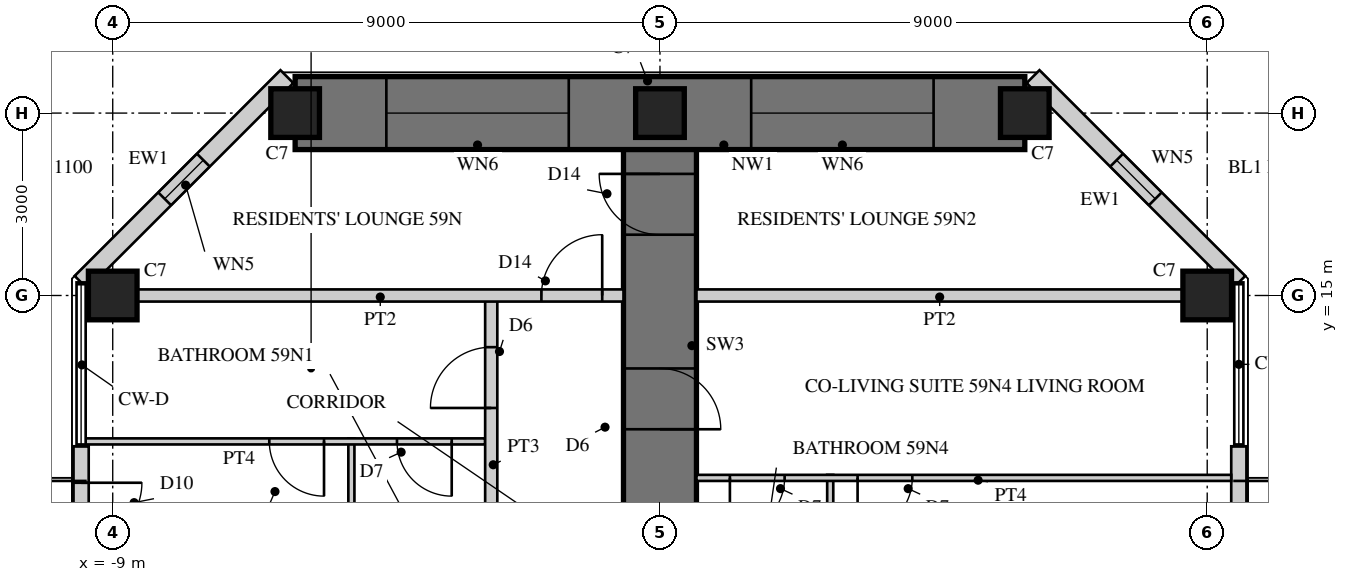
"""IFC4 building model, lengths in metres.
Left out: names, types, materials, properties, quantities, classifications, styles, units other than length and angle.
Written with IfcOpenShell. Run it as: python <this file> out.ifc"""

import sys

from ifc_helpers import new_model, si_unit, direction, frame, frame_2d, origin, origin_2d, place, context, subcontext, project, spatial, rectangle, hollow_rectangle, extrude, element, fill, save


model = new_model("IFC4")
c1 = context("Model", 3, precision=1e-05, world=origin(), true_north=direction((0.0, 1.0)))
c2 = subcontext(c1, "Body", "Model", "MODEL_VIEW")
j1 = project(units=[si_unit("LENGTHUNIT", "METRE"), si_unit("PLANEANGLEUNIT", "RADIAN")], contexts=[c1])
p1 = place(None, origin())
s1 = spatial("IfcSite", under=j1, at=p1, CompositionType="ELEMENT")
p2 = place(p1, origin())
s2 = spatial("IfcBuilding", under=s1, at=p2, CompositionType="ELEMENT")
p3 = place(p2, frame((0.0, 0.0, 232.3)))
s3 = spatial("IfcBuildingStorey", under=s2, at=p3, CompositionType="ELEMENT", Elevation=232.3)
p4 = place(p3, frame((0.0, 9.0, 0.0), z_axis=(0.0, 0.0, 1.0), x_axis=(0.0, 1.0, 0.0)))
e1 = element("IfcWall", 1, at=p4, inside=s3, PredefinedType="SHEAR", context=c2, shape_type="SweptSolid", body=[
    extrude(rectangle(XDim=9.0, YDim=1.2, at=frame_2d((4.5, 0.0))), origin(), (0.0, 0.0, 1.0), 3.4),
])
p5 = place(p4, frame((3.8, 0.0, 0.0)))
e2 = element("IfcOpeningElement", 2, at=p5, cuts=e1, PredefinedType="OPENING", context=c2, shape_type="SweptSolid", body=[
    extrude(rectangle(XDim=1.0, YDim=2.15, at=frame_2d((0.5, 1.075))), frame((0.0, 0.61, 0.0), z_axis=(0.0, -1.0, 0.0), x_axis=(1.0, 0.0, 0.0)), (0.0, 0.0, 1.0), 1.22),
])
p6 = place(p4, frame((7.0, 0.0, 0.0)))
e3 = element("IfcOpeningElement", 3, at=p6, cuts=e1, PredefinedType="OPENING", context=c2, shape_type="SweptSolid", body=[
    extrude(rectangle(XDim=1.0, YDim=2.2, at=frame_2d((0.5, 1.1))), frame((0.0, 0.61, 0.0), z_axis=(0.0, -1.0, 0.0), x_axis=(1.0, 0.0, 0.0)), (0.0, 0.0, 1.0), 1.22),
])
p7 = place(p3, frame((6.0, 18.0, 0.0), z_axis=(0.0, 0.0, 1.0), x_axis=(-1.0, 0.0, 0.0)))
e4 = element("IfcWall", 4, at=p7, inside=s3, PredefinedType="SHEAR", context=c2, shape_type="SweptSolid", body=[
    extrude(rectangle(XDim=12.0, YDim=1.2, at=frame_2d((6.0, 0.0))), origin(), (0.0, 0.0, 1.0), 3.4),
])
p8 = place(p7, frame((1.5, 0.0, 0.6)))
e5 = element("IfcOpeningElement", 5, at=p8, cuts=e4, PredefinedType="OPENING", context=c2, shape_type="SweptSolid", body=[
    extrude(rectangle(XDim=3.0, YDim=2.4, at=frame_2d((1.5, 1.2))), frame((0.0, 0.61, 0.0), z_axis=(0.0, -1.0, 0.0), x_axis=(1.0, 0.0, 0.0)), (0.0, 0.0, 1.0), 1.22),
])
p9 = place(p7, frame((7.5, 0.0, 0.6)))
e6 = element("IfcOpeningElement", 6, at=p9, cuts=e4, PredefinedType="OPENING", context=c2, shape_type="SweptSolid", body=[
    extrude(rectangle(XDim=3.0, YDim=2.4, at=frame_2d((1.5, 1.2))), frame((0.0, 0.61, 0.0), z_axis=(0.0, -1.0, 0.0), x_axis=(1.0, 0.0, 0.0)), (0.0, 0.0, 1.0), 1.22),
])
for number, where, z_axis, x_axis in (
    (7, (9.0, 15.0, 0.0), (0.0, 0.0, 1.0), (1.0, 0.0, 0.0)),
    (8, (-9.0, 15.0, 0.0), (0.0, 0.0, 1.0), (1.0, 0.0, 0.0)),
    (9, (6.0, 18.0, 0.0), (0.0, 0.0, 1.0), (1.0, 0.0, 0.0)),
    (10, (0.0, 18.0, 0.0), (0.0, 0.0, 1.0), (1.0, 0.0, 0.0)),
    (11, (-6.0, 18.0, 0.0), (0.0, 0.0, 1.0), (1.0, 0.0, 0.0)),
):
    element("IfcColumn", number, at=place(p3, frame(where, z_axis=z_axis, x_axis=x_axis)), inside=s3, PredefinedType="COLUMN", context=c2, shape_type="SweptSolid", body=[
        extrude(rectangle(XDim=0.8, YDim=0.8, at=origin_2d()), origin(), (0.0, 0.0, 1.0), 3.4),
    ])
p10 = place(p3, frame((9.52, 9.395, 0.0), z_axis=(0.0, 0.0, 1.0), x_axis=(0.0, 1.0, 0.0)))
e12 = element("IfcWall", 12, at=p10, inside=s3, PredefinedType="SOLIDWALL", context=c2, shape_type="SweptSolid", body=[
    extrude(rectangle(XDim=3.125, YDim=0.25, at=frame_2d((1.562, 0.0))), origin(), (0.0, 0.0, 1.0), 3.22),
])
p11 = place(p10, frame((0.6, 0.0, 0.0)))
e13 = element("IfcOpeningElement", 13, at=p11, cuts=e12, PredefinedType="OPENING", context=c2, shape_type="SweptSolid", body=[
    extrude(rectangle(XDim=1.0, YDim=2.2, at=frame_2d((0.5, 1.1))), frame((0.0, 0.135, 0.0), z_axis=(0.0, -1.0, 0.0), x_axis=(1.0, 0.0, 0.0)), (0.0, 0.0, 1.0), 0.27),
])
p12 = place(p3, frame((9.52, 15.215, 0.0), z_axis=(0.0, 0.0, 1.0), x_axis=(-0.707081278264, 0.707132283189, 0.0)))
e14 = element("IfcWall", 14, at=p12, inside=s3, PredefinedType="SOLIDWALL", context=c2, shape_type="SweptSolid", body=[
    extrude(rectangle(XDim=4.787, YDim=0.3, at=frame_2d((2.393, 0.0))), origin(), (0.0, 0.0, 1.0), 3.22),
])
p13 = place(p12, frame((1.943, 0.0, 0.3)))
e15 = element("IfcOpeningElement", 15, at=p13, cuts=e14, PredefinedType="OPENING", context=c2, shape_type="SweptSolid", body=[
    extrude(rectangle(XDim=0.9, YDim=2.4, at=frame_2d((0.45, 1.2))), frame((0.0, 0.16, 0.0), z_axis=(0.0, -1.0, 0.0), x_axis=(1.0, 0.0, 0.0)), (0.0, 0.0, 1.0), 0.32),
])
p14 = place(p3, frame((-6.135, 18.6, 0.0), z_axis=(0.0, 0.0, 1.0), x_axis=(-0.707081278264, -0.707132283189, 0.0)))
e16 = element("IfcWall", 16, at=p14, inside=s3, PredefinedType="SOLIDWALL", context=c2, shape_type="SweptSolid", body=[
    extrude(rectangle(XDim=4.787, YDim=0.3, at=frame_2d((2.393, 0.0))), origin(), (0.0, 0.0, 1.0), 3.22),
])
p15 = place(p14, frame((1.943, 0.0, 0.3)))
e17 = element("IfcOpeningElement", 17, at=p15, cuts=e16, PredefinedType="OPENING", context=c2, shape_type="SweptSolid", body=[
    extrude(rectangle(XDim=0.9, YDim=2.4, at=frame_2d((0.45, 1.2))), frame((0.0, 0.16, 0.0), z_axis=(0.0, -1.0, 0.0), x_axis=(1.0, 0.0, 0.0)), (0.0, 0.0, 1.0), 0.32),
])
p16 = place(p3, frame((-9.52, 12.52, 0.0), z_axis=(0.0, 0.0, 1.0), x_axis=(0.0, -1.0, 0.0)))
e18 = element("IfcWall", 18, at=p16, inside=s3, PredefinedType="SOLIDWALL", context=c2, shape_type="SweptSolid", body=[
    extrude(rectangle(XDim=2.875, YDim=0.25, at=frame_2d((1.438, 0.0))), origin(), (0.0, 0.0, 1.0), 3.22),
])
p17 = place(p16, frame((0.6, 0.0, 0.0)))
e19 = element("IfcOpeningElement", 19, at=p17, cuts=e18, PredefinedType="OPENING", context=c2, shape_type="SweptSolid", body=[
    extrude(rectangle(XDim=1.0, YDim=2.2, at=frame_2d((0.5, 1.1))), frame((0.0, 0.135, 0.0), z_axis=(0.0, -1.0, 0.0), x_axis=(1.0, 0.0, 0.0)), (0.0, 0.0, 1.0), 0.27),
])
p18 = place(p3, frame((-5.075, 9.4, 0.0), z_axis=(0.0, 0.0, 1.0), x_axis=(0.0, 1.0, 0.0)))
e20 = element("IfcWall", 20, at=p18, inside=s3, PredefinedType="PARTITIONING", context=c2, shape_type="SweptSolid", body=[
    extrude(rectangle(XDim=3.25, YDim=0.1, at=frame_2d((1.625, 0.0))), origin(), (0.0, 0.0, 1.0), 3.22),
])
p19 = place(p3, frame((-2.875, 12.6, 0.0), z_axis=(0.0, 0.0, 1.0), x_axis=(-1.0, 0.0, 0.0)))
e21 = element("IfcWall", 21, at=p19, inside=s3, PredefinedType="PARTITIONING", context=c2, shape_type="SweptSolid", body=[
    extrude(rectangle(XDim=6.605, YDim=0.1, at=frame_2d((3.302, 0.0))), origin(), (0.0, 0.0, 1.0), 3.22),
])
p20 = place(p19, frame((0.55, 0.0, 0.0)))
e22 = element("IfcOpeningElement", 22, at=p20, cuts=e21, PredefinedType="OPENING", context=c2, shape_type="SweptSolid", body=[
    extrude(rectangle(XDim=0.9, YDim=2.1, at=frame_2d((0.45, 1.05))), frame((0.0, 0.06, 0.0), z_axis=(0.0, -1.0, 0.0), x_axis=(1.0, 0.0, 0.0)), (0.0, 0.0, 1.0), 0.12),
])
p21 = place(p19, frame((2.65, 0.0, 0.0)))
e23 = element("IfcOpeningElement", 23, at=p21, cuts=e21, PredefinedType="OPENING", context=c2, shape_type="SweptSolid", body=[
    extrude(rectangle(XDim=0.9, YDim=2.1, at=frame_2d((0.45, 1.05))), frame((0.0, 0.06, 0.0), z_axis=(0.0, -1.0, 0.0), x_axis=(1.0, 0.0, 0.0)), (0.0, 0.0, 1.0), 0.12),
])
p22 = place(p3, frame((2.8, 9.4, 0.0), z_axis=(0.0, 0.0, 1.0), x_axis=(0.0, 1.0, 0.0)))
e24 = element("IfcWall", 24, at=p22, inside=s3, PredefinedType="PARTITIONING", context=c2, shape_type="SweptSolid", body=[
    extrude(rectangle(XDim=2.65, YDim=0.1, at=frame_2d((1.325, 0.0))), origin(), (0.0, 0.0, 1.0), 3.22),
])
p23 = place(p3, frame((9.395, 12.0, 0.0), z_axis=(0.0, 0.0, 1.0), x_axis=(-1.0, 0.0, 0.0)))
e25 = element("IfcWall", 25, at=p23, inside=s3, PredefinedType="PARTITIONING", context=c2, shape_type="SweptSolid", body=[
    extrude(rectangle(XDim=8.795, YDim=0.1, at=frame_2d((4.397, 0.0))), origin(), (0.0, 0.0, 1.0), 3.22),
])
p24 = place(p23, frame((5.245, 0.0, 0.0)))
e26 = element("IfcOpeningElement", 26, at=p24, cuts=e25, PredefinedType="OPENING", context=c2, shape_type="SweptSolid", body=[
    extrude(rectangle(XDim=0.9, YDim=2.1, at=frame_2d((0.45, 1.05))), frame((0.0, 0.06, 0.0), z_axis=(0.0, -1.0, 0.0), x_axis=(1.0, 0.0, 0.0)), (0.0, 0.0, 1.0), 0.12),
])
p25 = place(p23, frame((7.345, 0.0, 0.0)))
e27 = element("IfcOpeningElement", 27, at=p25, cuts=e25, PredefinedType="OPENING", context=c2, shape_type="SweptSolid", body=[
    extrude(rectangle(XDim=0.9, YDim=2.1, at=frame_2d((0.45, 1.05))), frame((0.0, 0.06, 0.0), z_axis=(0.0, -1.0, 0.0), x_axis=(1.0, 0.0, 0.0)), (0.0, 0.0, 1.0), 0.12),
])
p26 = place(p3, frame((-2.775, 9.4, 0.0), z_axis=(0.0, 0.0, 1.0), x_axis=(0.0, 1.0, 0.0)))
e28 = element("IfcWall", 28, at=p26, inside=s3, PredefinedType="SOLIDWALL", context=c2, shape_type="SweptSolid", body=[
    extrude(rectangle(XDim=5.6, YDim=0.2, at=frame_2d((2.8, 0.0))), origin(), (0.0, 0.0, 1.0), 3.22),
])
p27 = place(p26, frame((3.75, 0.0, 0.0)))
e29 = element("IfcOpeningElement", 29, at=p27, cuts=e28, PredefinedType="OPENING", context=c2, shape_type="SweptSolid", body=[
    extrude(rectangle(XDim=1.0, YDim=2.15, at=frame_2d((0.5, 1.075))), frame((0.0, 0.11, 0.0), z_axis=(0.0, -1.0, 0.0), x_axis=(1.0, 0.0, 0.0)), (0.0, 0.0, 1.0), 0.22),
])
p28 = place(p3, frame((8.6, 15.0, 0.0), z_axis=(0.0, 0.0, 1.0), x_axis=(-1.0, 0.0, 0.0)))
e30 = element("IfcWall", 30, at=p28, inside=s3, PredefinedType="SOLIDWALL", context=c2, shape_type="SweptSolid", body=[
    extrude(rectangle(XDim=8.0, YDim=0.2, at=frame_2d((4.0, 0.0))), origin(), (0.0, 0.0, 1.0), 2.52),
])
p29 = place(p3, frame((-0.6, 15.0, 0.0), z_axis=(0.0, 0.0, 1.0), x_axis=(-1.0, 0.0, 0.0)))
e31 = element("IfcWall", 31, at=p29, inside=s3, PredefinedType="SOLIDWALL", context=c2, shape_type="SweptSolid", body=[
    extrude(rectangle(XDim=8.0, YDim=0.2, at=frame_2d((4.0, 0.0))), origin(), (0.0, 0.0, 1.0), 2.52),
])
p30 = place(p29, frame((0.35, 0.0, 0.0)))
e32 = element("IfcOpeningElement", 32, at=p30, cuts=e31, PredefinedType="OPENING", context=c2, shape_type="SweptSolid", body=[
    extrude(rectangle(XDim=1.0, YDim=2.2, at=frame_2d((0.5, 1.1))), frame((0.0, 0.11, 0.0), z_axis=(0.0, -1.0, 0.0), x_axis=(1.0, 0.0, 0.0)), (0.0, 0.0, 1.0), 0.22),
])
p31 = place(p13, origin())
e33 = element("IfcWindow", 33, at=p31, inside=s3, PartitioningType="SINGLE_PANEL", PredefinedType="WINDOW", context=c2, shape_type="SweptSolid", body=[
    extrude(hollow_rectangle(XDim=0.9, YDim=2.4, WallThickness=0.06, at=frame_2d((0.45, 1.2))), frame((0.0, 0.03, 0.0), z_axis=(0.0, -1.0, 0.0), x_axis=(1.0, 0.0, 0.0)), (0.0, 0.0, 1.0), 0.06),
    extrude(rectangle(XDim=0.779, YDim=2.279, at=frame_2d((0.45, 1.2))), frame((0.0, 0.03, 0.0), z_axis=(0.0, -1.0, 0.0), x_axis=(1.0, 0.0, 0.0)), (0.0, 0.0, 1.0), 0.06),
])
fill(e15, e33)
p32 = place(p8, origin())
e34 = element("IfcWindow", 34, at=p32, inside=s3, PartitioningType="SINGLE_PANEL", PredefinedType="WINDOW", context=c2, shape_type="SweptSolid", body=[
    extrude(hollow_rectangle(XDim=3.0, YDim=2.4, WallThickness=0.06, at=frame_2d((1.5, 1.2))), frame((0.0, 0.03, 0.0), z_axis=(0.0, -1.0, 0.0), x_axis=(1.0, 0.0, 0.0)), (0.0, 0.0, 1.0), 0.06),
    extrude(rectangle(XDim=2.879, YDim=2.279, at=frame_2d((1.5, 1.2))), frame((0.0, 0.03, 0.0), z_axis=(0.0, -1.0, 0.0), x_axis=(1.0, 0.0, 0.0)), (0.0, 0.0, 1.0), 0.06),
])
fill(e5, e34)
p33 = place(p9, origin())
e35 = element("IfcWindow", 35, at=p33, inside=s3, PartitioningType="SINGLE_PANEL", PredefinedType="WINDOW", context=c2, shape_type="SweptSolid", body=[
    extrude(hollow_rectangle(XDim=3.0, YDim=2.4, WallThickness=0.06, at=frame_2d((1.5, 1.2))), frame((0.0, 0.03, 0.0), z_axis=(0.0, -1.0, 0.0), x_axis=(1.0, 0.0, 0.0)), (0.0, 0.0, 1.0), 0.06),
    extrude(rectangle(XDim=2.879, YDim=2.279, at=frame_2d((1.5, 1.2))), frame((0.0, 0.03, 0.0), z_axis=(0.0, -1.0, 0.0), x_axis=(1.0, 0.0, 0.0)), (0.0, 0.0, 1.0), 0.06),
])
fill(e6, e35)
p34 = place(p15, origin())
e36 = element("IfcWindow", 36, at=p34, inside=s3, PartitioningType="SINGLE_PANEL", PredefinedType="WINDOW", context=c2, shape_type="SweptSolid", body=[
    extrude(hollow_rectangle(XDim=0.9, YDim=2.4, WallThickness=0.06, at=frame_2d((0.45, 1.2))), frame((0.0, 0.03, 0.0), z_axis=(0.0, -1.0, 0.0), x_axis=(1.0, 0.0, 0.0)), (0.0, 0.0, 1.0), 0.06),
    extrude(rectangle(XDim=0.779, YDim=2.279, at=frame_2d((0.45, 1.2))), frame((0.0, 0.03, 0.0), z_axis=(0.0, -1.0, 0.0), x_axis=(1.0, 0.0, 0.0)), (0.0, 0.0, 1.0), 0.06),
])
fill(e17, e36)
p35 = place(p17, origin())
e37 = element("IfcDoor", 37, at=p35, inside=s3, OperationType="SINGLE_SWING_LEFT", PredefinedType="DOOR", context=c2, shape_type="SweptSolid", body=[
    extrude(hollow_rectangle(XDim=1.0, YDim=2.2, WallThickness=0.06, at=frame_2d((0.5, 1.1))), frame((0.0, 0.025, 0.0), z_axis=(0.0, -1.0, 0.0), x_axis=(1.0, 0.0, 0.0)), (0.0, 0.0, 1.0), 0.05),
    extrude(rectangle(XDim=0.879, YDim=2.079, at=frame_2d((0.5, 1.1))), frame((0.0, 0.025, 0.0), z_axis=(0.0, -1.0, 0.0), x_axis=(1.0, 0.0, 0.0)), (0.0, 0.0, 1.0), 0.05),
])
fill(e19, e37)
p36 = place(p20, origin())
e38 = element("IfcDoor", 38, at=p36, inside=s3, OperationType="SINGLE_SWING_LEFT", PredefinedType="DOOR", context=c2, shape_type="SweptSolid", body=[
    extrude(rectangle(XDim=0.9, YDim=2.1, at=frame_2d((0.45, 1.05))), frame((0.0, 0.025, 0.0), z_axis=(0.0, -1.0, 0.0), x_axis=(1.0, 0.0, 0.0)), (0.0, 0.0, 1.0), 0.05),
])
fill(e22, e38)
p37 = place(p21, origin())
e39 = element("IfcDoor", 39, at=p37, inside=s3, OperationType="SINGLE_SWING_LEFT", PredefinedType="DOOR", context=c2, shape_type="SweptSolid", body=[
    extrude(rectangle(XDim=0.9, YDim=2.1, at=frame_2d((0.45, 1.05))), frame((0.0, 0.025, 0.0), z_axis=(0.0, -1.0, 0.0), x_axis=(1.0, 0.0, 0.0)), (0.0, 0.0, 1.0), 0.05),
])
fill(e23, e39)
p38 = place(p24, origin())
e40 = element("IfcDoor", 40, at=p38, inside=s3, OperationType="SINGLE_SWING_RIGHT", PredefinedType="DOOR", context=c2, shape_type="SweptSolid", body=[
    extrude(rectangle(XDim=0.9, YDim=2.1, at=frame_2d((0.45, 1.05))), frame((0.0, 0.025, 0.0), z_axis=(0.0, -1.0, 0.0), x_axis=(1.0, 0.0, 0.0)), (0.0, 0.0, 1.0), 0.05),
])
fill(e26, e40)
p39 = place(p25, origin())
e41 = element("IfcDoor", 41, at=p39, inside=s3, OperationType="SINGLE_SWING_RIGHT", PredefinedType="DOOR", context=c2, shape_type="SweptSolid", body=[
    extrude(rectangle(XDim=0.9, YDim=2.1, at=frame_2d((0.45, 1.05))), frame((0.0, 0.025, 0.0), z_axis=(0.0, -1.0, 0.0), x_axis=(1.0, 0.0, 0.0)), (0.0, 0.0, 1.0), 0.05),
])
fill(e27, e41)
p40 = place(p27, origin())
e42 = element("IfcDoor", 42, at=p40, inside=s3, OperationType="SINGLE_SWING_LEFT", PredefinedType="DOOR", context=c2, shape_type="SweptSolid", body=[
    extrude(rectangle(XDim=1.0, YDim=2.15, at=frame_2d((0.5, 1.075))), frame((0.0, 0.025, 0.0), z_axis=(0.0, -1.0, 0.0), x_axis=(1.0, 0.0, 0.0)), (0.0, 0.0, 1.0), 0.05),
])
fill(e29, e42)
p41 = place(p30, frame((1.0, 0.0, 0.0), z_axis=(0.0, 0.0, 1.0), x_axis=(-1.0, 0.0, 0.0)))
e43 = element("IfcDoor", 43, at=p41, inside=s3, OperationType="SINGLE_SWING_RIGHT", PredefinedType="DOOR", context=c2, shape_type="SweptSolid", body=[
    extrude(rectangle(XDim=1.0, YDim=2.2, at=frame_2d((0.5, 1.1))), frame((0.0, 0.025, 0.0), z_axis=(0.0, -1.0, 0.0), x_axis=(1.0, 0.0, 0.0)), (0.0, 0.0, 1.0), 0.05),
])
fill(e32, e43)
p42 = place(p5, frame((1.0, 0.0, 0.0), z_axis=(0.0, 0.0, 1.0), x_axis=(-1.0, 0.0, 0.0)))
e44 = element("IfcDoor", 44, at=p42, inside=s3, OperationType="SINGLE_SWING_RIGHT", PredefinedType="DOOR", context=c2, shape_type="SweptSolid", body=[
    extrude(rectangle(XDim=1.0, YDim=2.15, at=frame_2d((0.5, 1.075))), frame((0.0, 0.025, 0.0), z_axis=(0.0, -1.0, 0.0), x_axis=(1.0, 0.0, 0.0)), (0.0, 0.0, 1.0), 0.05),
])
fill(e2, e44)
p43 = place(p6, origin())
e45 = element("IfcDoor", 45, at=p43, inside=s3, OperationType="SINGLE_SWING_RIGHT", PredefinedType="DOOR", context=c2, shape_type="SweptSolid", body=[
    extrude(rectangle(XDim=1.0, YDim=2.2, at=frame_2d((0.5, 1.1))), frame((0.0, 0.025, 0.0), z_axis=(0.0, -1.0, 0.0), x_axis=(1.0, 0.0, 0.0)), (0.0, 0.0, 1.0), 0.05),
])
fill(e3, e45)
save(model, sys.argv[1])
